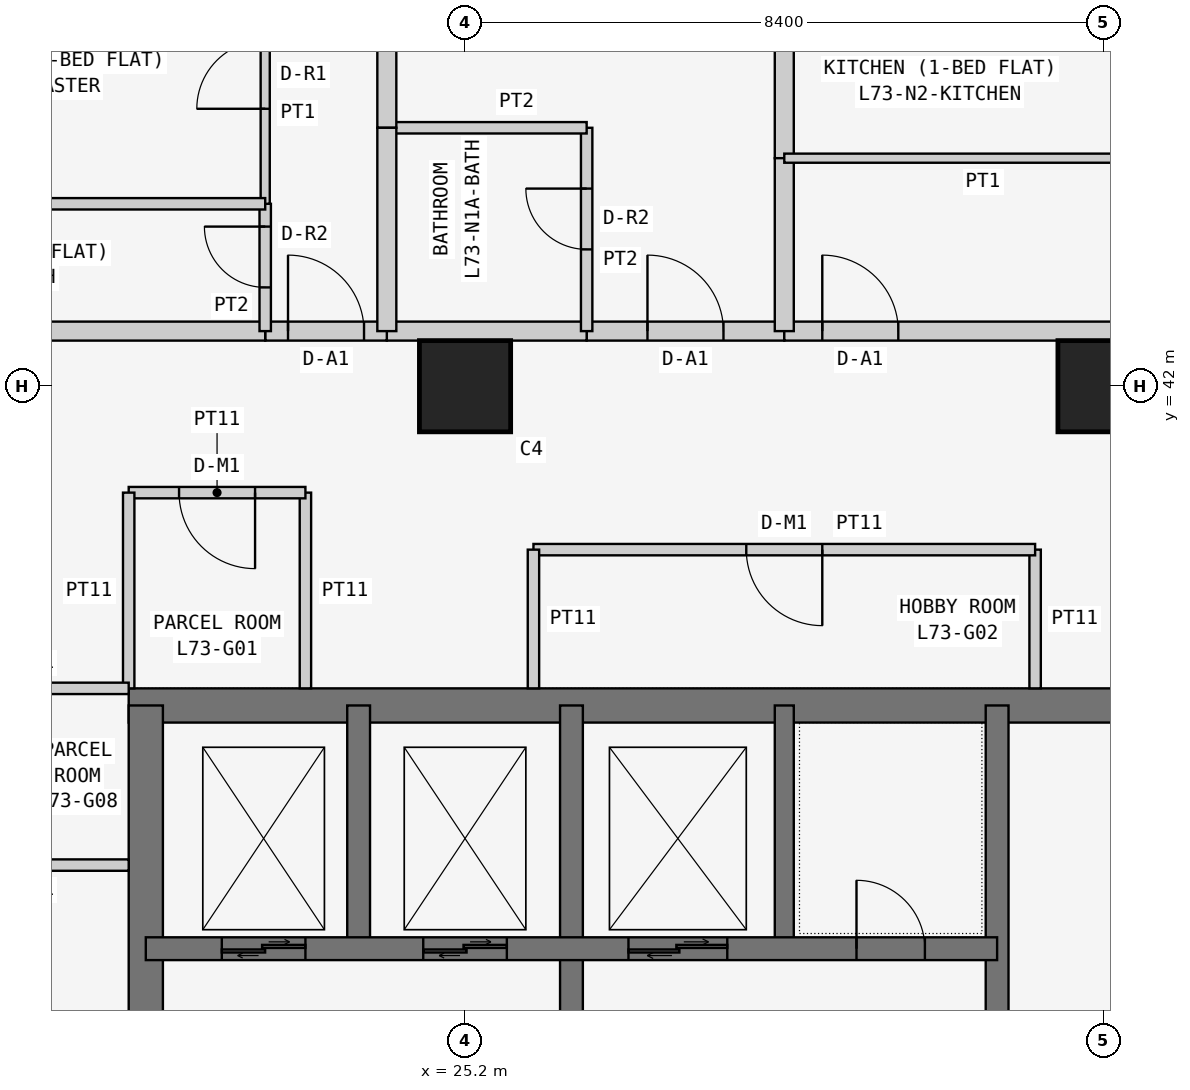
"""IFC4 building model, lengths in metres.
Left out: names, types, materials, properties, quantities, classifications, styles, units other than length and angle.
Written with IfcOpenShell. Run it as: python <this file> out.ifc"""

import sys

from ifc_helpers import new_model, si_unit, direction, frame, frame_2d, origin, origin_2d, place, context, subcontext, project, spatial, rectangle, extrude, element, fill, save


model = new_model("IFC4")
c1 = context("Model", 3, precision=1e-05, world=origin(), true_north=direction((0.0, 1.0)))
c2 = subcontext(c1, "Body", "Model", "MODEL_VIEW")
j1 = project(units=[si_unit("LENGTHUNIT", "METRE"), si_unit("PLANEANGLEUNIT", "RADIAN")], contexts=[c1])
p1 = place(None, origin())
s1 = spatial("IfcSite", under=j1, at=p1, CompositionType="ELEMENT")
p2 = place(p1, origin())
s2 = spatial("IfcBuilding", under=s1, at=p2, CompositionType="ELEMENT")
p3 = place(p2, frame((0.0, 0.0, 279.3)))
s3 = spatial("IfcBuildingStorey", under=s2, at=p3, CompositionType="ELEMENT", Elevation=279.3)
for number, where, z_axis, x_axis in (
    (1, (25.2, 42.0, 0.0), (0.0, 0.0, 1.0), (1.0, 0.0, 0.0)),
    (2, (33.6, 42.0, 0.0), (0.0, 0.0, 1.0), (1.0, 0.0, 0.0)),
):
    element("IfcColumn", number, at=place(p3, frame(where, z_axis=z_axis, x_axis=x_axis)), inside=s3, PredefinedType="COLUMN", context=c2, shape_type="SweptSolid", body=[
        extrude(rectangle(XDim=1.2, YDim=1.2, at=origin_2d()), origin(), (0.0, 0.0, 1.0), 3.6),
    ])
p4 = place(p3, frame((37.8, 37.8, 0.0), z_axis=(0.0, 0.0, 1.0), x_axis=(-1.0, 0.0, 0.0)))
e3 = element("IfcWall", 3, at=p4, inside=s3, PredefinedType="SHEAR", context=c2, shape_type="SweptSolid", body=[
    extrude(rectangle(XDim=17.025, YDim=0.45, at=frame_2d((8.513, 0.0))), origin(), (0.0, 0.0, 1.0), 3.6),
])
p5 = place(p3, frame((21.0, 37.8, 0.0), z_axis=(0.0, 0.0, 1.0), x_axis=(0.0, -1.0, 0.0)))
e4 = element("IfcWall", 4, at=p5, inside=s3, PredefinedType="SHEAR", context=c2, shape_type="SweptSolid", body=[
    extrude(rectangle(XDim=17.025, YDim=0.45, at=frame_2d((8.513, 0.0))), origin(), (0.0, 0.0, 1.0), 3.6),
])
p6 = place(p5, frame((5.4, 0.0, 0.0)))
e5 = element("IfcOpeningElement", 5, at=p6, cuts=e4, PredefinedType="OPENING", context=c2, shape_type="SweptSolid", body=[
    extrude(rectangle(XDim=1.2, YDim=2.1, at=frame_2d((0.6, 1.05))), frame((0.0, 0.235, 0.0), z_axis=(0.0, -1.0, 0.0), x_axis=(1.0, 0.0, 0.0)), (0.0, 0.0, 1.0), 0.47),
])
p7 = place(p3, frame((26.6, 21.0, 0.0), z_axis=(0.0, 0.0, 1.0), x_axis=(0.0, 1.0, 0.0)))
e6 = element("IfcWall", 6, at=p7, inside=s3, PredefinedType="SHEAR", context=c2, shape_type="SweptSolid", body=[
    extrude(rectangle(XDim=16.8, YDim=0.3, at=frame_2d((8.4, 0.0))), origin(), (0.0, 0.0, 1.0), 3.6),
])
p8 = place(p7, frame((10.4, 0.0, 0.0)))
e7 = element("IfcOpeningElement", 7, at=p8, cuts=e6, PredefinedType="OPENING", context=c2, shape_type="SweptSolid", body=[
    extrude(rectangle(XDim=1.2, YDim=2.1, at=frame_2d((0.6, 1.05))), frame((0.0, 0.16, 0.0), z_axis=(0.0, -1.0, 0.0), x_axis=(1.0, 0.0, 0.0)), (0.0, 0.0, 1.0), 0.32),
])
p9 = place(p3, frame((21.0, 34.6, 0.0), z_axis=(0.0, 0.0, 1.0), x_axis=(1.0, 0.0, 0.0)))
e8 = element("IfcWall", 8, at=p9, inside=s3, PredefinedType="SHEAR", context=c2, shape_type="SweptSolid", body=[
    extrude(rectangle(XDim=11.2, YDim=0.3, at=frame_2d((5.6, 0.0))), origin(), (0.0, 0.0, 1.0), 3.6),
])
p10 = place(p9, frame((9.35, 0.0, 0.0)))
e9 = element("IfcOpeningElement", 9, at=p10, cuts=e8, PredefinedType="OPENING", context=c2, shape_type="SweptSolid", body=[
    extrude(rectangle(XDim=0.9, YDim=2.1, at=frame_2d((0.45, 1.05))), frame((0.0, 0.16, 0.0), z_axis=(0.0, -1.0, 0.0), x_axis=(1.0, 0.0, 0.0)), (0.0, 0.0, 1.0), 0.32),
])
p11 = place(p9, frame((1.0, 0.0, 0.0)))
e10 = element("IfcOpeningElement", 10, at=p11, cuts=e8, PredefinedType="OPENING", context=c2, shape_type="SweptSolid", body=[
    extrude(rectangle(XDim=1.1, YDim=2.1, at=frame_2d((0.55, 1.05))), frame((0.0, 0.16, 0.0), z_axis=(0.0, -1.0, 0.0), x_axis=(1.0, 0.0, 0.0)), (0.0, 0.0, 1.0), 0.32),
])
p12 = place(p9, frame((3.65, 0.0, 0.0)))
e11 = element("IfcOpeningElement", 11, at=p12, cuts=e8, PredefinedType="OPENING", context=c2, shape_type="SweptSolid", body=[
    extrude(rectangle(XDim=1.1, YDim=2.1, at=frame_2d((0.55, 1.05))), frame((0.0, 0.16, 0.0), z_axis=(0.0, -1.0, 0.0), x_axis=(1.0, 0.0, 0.0)), (0.0, 0.0, 1.0), 0.32),
])
p13 = place(p9, frame((6.35, 0.0, 0.0)))
e12 = element("IfcOpeningElement", 12, at=p13, cuts=e8, PredefinedType="OPENING", context=c2, shape_type="SweptSolid", body=[
    extrude(rectangle(XDim=1.3, YDim=2.1, at=frame_2d((0.65, 1.05))), frame((0.0, 0.16, 0.0), z_axis=(0.0, -1.0, 0.0), x_axis=(1.0, 0.0, 0.0)), (0.0, 0.0, 1.0), 0.32),
])
p14 = place(p3, frame((23.8, 34.6, 0.0), z_axis=(0.0, 0.0, 1.0), x_axis=(0.0, 1.0, 0.0)))
e13 = element("IfcWall", 13, at=p14, inside=s3, PredefinedType="SHEAR", context=c2, shape_type="SweptSolid", body=[
    extrude(rectangle(XDim=3.2, YDim=0.3, at=frame_2d((1.6, 0.0))), origin(), (0.0, 0.0, 1.0), 3.6),
])
p15 = place(p3, frame((32.2, 29.25, 0.0), z_axis=(0.0, 0.0, 1.0), x_axis=(0.0, 1.0, 0.0)))
e14 = element("IfcWall", 14, at=p15, inside=s3, PredefinedType="SHEAR", context=c2, shape_type="SweptSolid", body=[
    extrude(rectangle(XDim=8.55, YDim=0.3, at=frame_2d((4.275, 0.0))), origin(), (0.0, 0.0, 1.0), 3.6),
])
p16 = place(p3, frame((29.4, 34.6, 0.0), z_axis=(0.0, 0.0, 1.0), x_axis=(0.0, 1.0, 0.0)))
e15 = element("IfcWall", 15, at=p16, inside=s3, PredefinedType="SHEAR", context=c2, shape_type="SweptSolid", body=[
    extrude(rectangle(XDim=3.2, YDim=0.25, at=frame_2d((1.6, 0.0))), origin(), (0.0, 0.0, 1.0), 3.6),
])
p17 = place(p3, frame((23.1, 38.025, 0.0), z_axis=(0.0, 0.0, 1.0), x_axis=(0.0, 1.0, 0.0)))
e16 = element("IfcWall", 16, at=p17, inside=s3, PredefinedType="PARTITIONING", context=c2, shape_type="SweptSolid", body=[
    extrude(rectangle(XDim=2.575, YDim=0.15, at=frame_2d((1.288, 0.0))), origin(), (0.0, 0.0, 1.0), 3.45),
])
p18 = place(p3, frame((23.1, 40.6, 0.0), z_axis=(0.0, 0.0, 1.0), x_axis=(-1.0, 0.0, 0.0)))
e17 = element("IfcWall", 17, at=p18, inside=s3, PredefinedType="PARTITIONING", context=c2, shape_type="SweptSolid", body=[
    extrude(rectangle(XDim=2.325, YDim=0.15, at=frame_2d((1.163, 0.0))), origin(), (0.0, 0.0, 1.0), 3.45),
])
p19 = place(p18, frame((0.663, 0.0, 0.0)))
e18 = element("IfcOpeningElement", 18, at=p19, cuts=e17, PredefinedType="OPENING", context=c2, shape_type="SweptSolid", body=[
    extrude(rectangle(XDim=1.0, YDim=2.1, at=frame_2d((0.5, 1.05))), frame((0.0, 0.085, 0.0), z_axis=(0.0, -1.0, 0.0), x_axis=(1.0, 0.0, 0.0)), (0.0, 0.0, 1.0), 0.17),
])
p20 = place(p3, frame((20.775, 40.6, 0.0), z_axis=(0.0, 0.0, 1.0), x_axis=(0.0, -1.0, 0.0)))
e19 = element("IfcWall", 19, at=p20, inside=s3, PredefinedType="PARTITIONING", context=c2, shape_type="SweptSolid", body=[
    extrude(rectangle(XDim=2.575, YDim=0.15, at=frame_2d((1.288, 0.0))), origin(), (0.0, 0.0, 1.0), 3.45),
])
p21 = place(p3, frame((32.7, 38.025, 0.0), z_axis=(0.0, 0.0, 1.0), x_axis=(0.0, 1.0, 0.0)))
e20 = element("IfcWall", 20, at=p21, inside=s3, PredefinedType="PARTITIONING", context=c2, shape_type="SweptSolid", body=[
    extrude(rectangle(XDim=1.825, YDim=0.15, at=frame_2d((0.913, 0.0))), origin(), (0.0, 0.0, 1.0), 3.45),
])
p22 = place(p3, frame((32.7, 39.85, 0.0), z_axis=(0.0, 0.0, 1.0), x_axis=(-1.0, 0.0, 0.0)))
e21 = element("IfcWall", 21, at=p22, inside=s3, PredefinedType="PARTITIONING", context=c2, shape_type="SweptSolid", body=[
    extrude(rectangle(XDim=6.6, YDim=0.15, at=frame_2d((3.3, 0.0))), origin(), (0.0, 0.0, 1.0), 3.45),
])
p23 = place(p22, frame((2.8, 0.0, 0.0)))
e22 = element("IfcOpeningElement", 22, at=p23, cuts=e21, PredefinedType="OPENING", context=c2, shape_type="SweptSolid", body=[
    extrude(rectangle(XDim=1.0, YDim=2.1, at=frame_2d((0.5, 1.05))), frame((0.0, 0.085, 0.0), z_axis=(0.0, -1.0, 0.0), x_axis=(1.0, 0.0, 0.0)), (0.0, 0.0, 1.0), 0.17),
])
p24 = place(p3, frame((26.1, 39.85, 0.0), z_axis=(0.0, 0.0, 1.0), x_axis=(0.0, -1.0, 0.0)))
e23 = element("IfcWall", 23, at=p24, inside=s3, PredefinedType="PARTITIONING", context=c2, shape_type="SweptSolid", body=[
    extrude(rectangle(XDim=1.825, YDim=0.15, at=frame_2d((0.913, 0.0))), origin(), (0.0, 0.0, 1.0), 3.45),
])
for number, where, z_axis, x_axis in (
    (24, (20.775, 38.025, 0.0), (0.0, 0.0, 1.0), (-1.0, 0.0, 0.0)),
    (25, (18.2, 35.7, 0.0), (0.0, 0.0, 1.0), (1.0, 0.0, 0.0)),
):
    element("IfcWall", number, at=place(p3, frame(where, z_axis=z_axis, x_axis=x_axis)), inside=s3, PredefinedType="PARTITIONING", context=c2, shape_type="SweptSolid", body=[
        extrude(rectangle(XDim=2.575, YDim=0.15, at=frame_2d((1.288, 0.0))), origin(), (0.0, 0.0, 1.0), 3.45),
    ])
p25 = place(p3, frame((26.8, 42.725, 0.0), z_axis=(0.0, 0.0, 1.0), x_axis=(1.0, 0.0, 0.0)))
e26 = element("IfcWall", 26, at=p25, inside=s3, PredefinedType="PARTITIONING", context=c2, shape_type="SweptSolid", body=[
    extrude(rectangle(XDim=2.6, YDim=0.25, at=frame_2d((1.3, 0.0))), origin(), (0.0, 0.0, 1.0), 3.45),
])
p26 = place(p25, frame((0.8, 0.0, 0.0)))
e27 = element("IfcOpeningElement", 27, at=p26, cuts=e26, PredefinedType="OPENING", context=c2, shape_type="SweptSolid", body=[
    extrude(rectangle(XDim=1.0, YDim=2.1, at=frame_2d((0.5, 1.05))), frame((0.0, 0.135, 0.0), z_axis=(0.0, -1.0, 0.0), x_axis=(1.0, 0.0, 0.0)), (0.0, 0.0, 1.0), 0.27),
])
p27 = place(p3, frame((24.171, 42.725, 0.0), z_axis=(0.0, 0.0, 1.0), x_axis=(1.0, 0.0, 0.0)))
e28 = element("IfcWall", 28, at=p27, inside=s3, PredefinedType="PARTITIONING", context=c2, shape_type="SweptSolid", body=[
    extrude(rectangle(XDim=2.629, YDim=0.25, at=frame_2d((1.314, 0.0))), origin(), (0.0, 0.0, 1.0), 3.45),
])
p28 = place(p3, frame((22.571, 42.725, 0.0), z_axis=(0.0, 0.0, 1.0), x_axis=(1.0, 0.0, 0.0)))
e29 = element("IfcWall", 29, at=p28, inside=s3, PredefinedType="PARTITIONING", context=c2, shape_type="SweptSolid", body=[
    extrude(rectangle(XDim=1.6, YDim=0.25, at=frame_2d((0.8, 0.0))), origin(), (0.0, 0.0, 1.0), 3.45),
])
p29 = place(p28, frame((0.3, 0.0, 0.0)))
e30 = element("IfcOpeningElement", 30, at=p29, cuts=e29, PredefinedType="OPENING", context=c2, shape_type="SweptSolid", body=[
    extrude(rectangle(XDim=1.0, YDim=2.1, at=frame_2d((0.5, 1.05))), frame((0.0, 0.135, 0.0), z_axis=(0.0, -1.0, 0.0), x_axis=(1.0, 0.0, 0.0)), (0.0, 0.0, 1.0), 0.27),
])
p30 = place(p3, frame((16.1, 42.725, 0.0), z_axis=(0.0, 0.0, 1.0), x_axis=(1.0, 0.0, 0.0)))
e31 = element("IfcWall", 31, at=p30, inside=s3, PredefinedType="PARTITIONING", context=c2, shape_type="SweptSolid", body=[
    extrude(rectangle(XDim=6.471, YDim=0.25, at=frame_2d((3.235, 0.0))), origin(), (0.0, 0.0, 1.0), 3.45),
])
p31 = place(p3, frame((29.4, 42.725, 0.0), z_axis=(0.0, 0.0, 1.0), x_axis=(1.0, 0.0, 0.0)))
e32 = element("IfcWall", 32, at=p31, inside=s3, PredefinedType="PARTITIONING", context=c2, shape_type="SweptSolid", body=[
    extrude(rectangle(XDim=6.429, YDim=0.25, at=frame_2d((3.215, 0.0))), origin(), (0.0, 0.0, 1.0), 3.45),
])
p32 = place(p31, frame((0.5, 0.0, 0.0)))
e33 = element("IfcOpeningElement", 33, at=p32, cuts=e32, PredefinedType="OPENING", context=c2, shape_type="SweptSolid", body=[
    extrude(rectangle(XDim=1.0, YDim=2.1, at=frame_2d((0.5, 1.05))), frame((0.0, 0.135, 0.0), z_axis=(0.0, -1.0, 0.0), x_axis=(1.0, 0.0, 0.0)), (0.0, 0.0, 1.0), 0.27),
])
p33 = place(p3, frame((26.8, 42.725, 0.0), z_axis=(0.0, 0.0, 1.0), x_axis=(0.0, 1.0, 0.0)))
e34 = element("IfcWall", 34, at=p33, inside=s3, PredefinedType="PARTITIONING", context=c2, shape_type="SweptSolid", body=[
    extrude(rectangle(XDim=2.675, YDim=0.15, at=frame_2d((1.337, 0.0))), origin(), (0.0, 0.0, 1.0), 3.45),
])
p34 = place(p33, frame((1.075, 0.0, 0.0)))
e35 = element("IfcOpeningElement", 35, at=p34, cuts=e34, PredefinedType="OPENING", context=c2, shape_type="SweptSolid", body=[
    extrude(rectangle(XDim=0.8, YDim=2.1, at=frame_2d((0.4, 1.05))), frame((0.0, 0.085, 0.0), z_axis=(0.0, -1.0, 0.0), x_axis=(1.0, 0.0, 0.0)), (0.0, 0.0, 1.0), 0.17),
])
p35 = place(p3, frame((26.8, 45.4, 0.0), z_axis=(0.0, 0.0, 1.0), x_axis=(-1.0, 0.0, 0.0)))
e36 = element("IfcWall", 36, at=p35, inside=s3, PredefinedType="PARTITIONING", context=c2, shape_type="SweptSolid", body=[
    extrude(rectangle(XDim=2.629, YDim=0.15, at=frame_2d((1.314, 0.0))), origin(), (0.0, 0.0, 1.0), 3.45),
])
p36 = place(p3, frame((24.171, 45.4, 0.0), z_axis=(0.0, 0.0, 1.0), x_axis=(0.0, 1.0, 0.0)))
e37 = element("IfcWall", 37, at=p36, inside=s3, PredefinedType="PARTITIONING", context=c2, shape_type="SweptSolid", body=[
    extrude(rectangle(XDim=5.65, YDim=0.25, at=frame_2d((2.825, 0.0))), origin(), (0.0, 0.0, 1.0), 3.45),
])
p37 = place(p3, frame((29.4, 47.0, 0.0), z_axis=(0.0, 0.0, 1.0), x_axis=(0.0, -1.0, 0.0)))
e38 = element("IfcWall", 38, at=p37, inside=s3, PredefinedType="PARTITIONING", context=c2, shape_type="SweptSolid", body=[
    extrude(rectangle(XDim=2.0, YDim=0.25, at=frame_2d((1.0, 0.0))), origin(), (0.0, 0.0, 1.0), 2.848),
])
p38 = place(p3, frame((29.4, 45.0, 0.0), z_axis=(0.0, 0.0, 1.0), x_axis=(0.0, -1.0, 0.0)))
e39 = element("IfcWall", 39, at=p38, inside=s3, PredefinedType="PARTITIONING", context=c2, shape_type="SweptSolid", body=[
    extrude(rectangle(XDim=2.275, YDim=0.25, at=frame_2d((1.137, 0.0))), origin(), (0.0, 0.0, 1.0), 2.848),
])
p39 = place(p3, frame((24.171, 45.4, 0.0), z_axis=(0.0, 0.0, 1.0), x_axis=(0.0, -1.0, 0.0)))
e40 = element("IfcWall", 40, at=p39, inside=s3, PredefinedType="PARTITIONING", context=c2, shape_type="SweptSolid", body=[
    extrude(rectangle(XDim=2.675, YDim=0.25, at=frame_2d((1.337, 0.0))), origin(), (0.0, 0.0, 1.0), 3.45),
])
p40 = place(p3, frame((22.571, 42.725, 0.0), z_axis=(0.0, 0.0, 1.0), x_axis=(0.0, 1.0, 0.0)))
e41 = element("IfcWall", 41, at=p40, inside=s3, PredefinedType="PARTITIONING", context=c2, shape_type="SweptSolid", body=[
    extrude(rectangle(XDim=1.675, YDim=0.15, at=frame_2d((0.837, 0.0))), origin(), (0.0, 0.0, 1.0), 3.45),
])
p41 = place(p40, frame((0.575, 0.0, 0.0)))
e42 = element("IfcOpeningElement", 42, at=p41, cuts=e41, PredefinedType="OPENING", context=c2, shape_type="SweptSolid", body=[
    extrude(rectangle(XDim=0.8, YDim=2.1, at=frame_2d((0.4, 1.05))), frame((0.0, 0.085, 0.0), z_axis=(0.0, -1.0, 0.0), x_axis=(1.0, 0.0, 0.0)), (0.0, 0.0, 1.0), 0.17),
])
p42 = place(p3, frame((22.571, 44.4, 0.0), z_axis=(0.0, 0.0, 1.0), x_axis=(0.0, 1.0, 0.0)))
e43 = element("IfcWall", 43, at=p42, inside=s3, PredefinedType="PARTITIONING", context=c2, shape_type="SweptSolid", body=[
    extrude(rectangle(XDim=3.4, YDim=0.12, at=frame_2d((1.7, 0.0))), origin(), (0.0, 0.0, 1.0), 3.45),
])
p43 = place(p42, frame((1.25, 0.0, 0.0)))
e44 = element("IfcOpeningElement", 44, at=p43, cuts=e43, PredefinedType="OPENING", context=c2, shape_type="SweptSolid", body=[
    extrude(rectangle(XDim=0.9, YDim=2.1, at=frame_2d((0.45, 1.05))), frame((0.0, 0.07, 0.0), z_axis=(0.0, -1.0, 0.0), x_axis=(1.0, 0.0, 0.0)), (0.0, 0.0, 1.0), 0.14),
])
p44 = place(p3, frame((22.571, 44.4, 0.0), z_axis=(0.0, 0.0, 1.0), x_axis=(-1.0, 0.0, 0.0)))
e45 = element("IfcWall", 45, at=p44, inside=s3, PredefinedType="PARTITIONING", context=c2, shape_type="SweptSolid", body=[
    extrude(rectangle(XDim=6.471, YDim=0.15, at=frame_2d((3.235, 0.0))), origin(), (0.0, 0.0, 1.0), 3.45),
])
p45 = place(p3, frame((34.629, 45.0, 0.0), z_axis=(0.0, 0.0, 1.0), x_axis=(-1.0, 0.0, 0.0)))
e46 = element("IfcWall", 46, at=p45, inside=s3, PredefinedType="PARTITIONING", context=c2, shape_type="SweptSolid", body=[
    extrude(rectangle(XDim=5.229, YDim=0.12, at=frame_2d((2.615, 0.0))), origin(), (0.0, 0.0, 1.0), 3.45),
])
p46 = place(p19, origin())
e47 = element("IfcDoor", 47, at=p46, inside=s3, OperationType="SINGLE_SWING_LEFT", PredefinedType="DOOR", context=c2, shape_type="SweptSolid", body=[
    extrude(rectangle(XDim=1.0, YDim=2.1, at=frame_2d((0.5, 1.05))), frame((0.0, 0.025, 0.0), z_axis=(0.0, -1.0, 0.0), x_axis=(1.0, 0.0, 0.0)), (0.0, 0.0, 1.0), 0.05),
])
fill(e18, e47)
p47 = place(p23, origin())
e48 = element("IfcDoor", 48, at=p47, inside=s3, OperationType="SINGLE_SWING_LEFT", PredefinedType="DOOR", context=c2, shape_type="SweptSolid", body=[
    extrude(rectangle(XDim=1.0, YDim=2.1, at=frame_2d((0.5, 1.05))), frame((0.0, 0.025, 0.0), z_axis=(0.0, -1.0, 0.0), x_axis=(1.0, 0.0, 0.0)), (0.0, 0.0, 1.0), 0.05),
])
fill(e22, e48)
p48 = place(p26, origin())
e49 = element("IfcDoor", 49, at=p48, inside=s3, OperationType="SINGLE_SWING_LEFT", PredefinedType="DOOR", context=c2, shape_type="SweptSolid", body=[
    extrude(rectangle(XDim=1.0, YDim=2.1, at=frame_2d((0.5, 1.05))), frame((0.0, 0.025, 0.0), z_axis=(0.0, -1.0, 0.0), x_axis=(1.0, 0.0, 0.0)), (0.0, 0.0, 1.0), 0.05),
])
fill(e27, e49)
p49 = place(p34, origin())
e50 = element("IfcDoor", 50, at=p49, inside=s3, OperationType="SINGLE_SWING_RIGHT", PredefinedType="DOOR", context=c2, shape_type="SweptSolid", body=[
    extrude(rectangle(XDim=0.8, YDim=2.1, at=frame_2d((0.4, 1.05))), frame((0.0, 0.025, 0.0), z_axis=(0.0, -1.0, 0.0), x_axis=(1.0, 0.0, 0.0)), (0.0, 0.0, 1.0), 0.05),
])
fill(e35, e50)
p50 = place(p29, origin())
e51 = element("IfcDoor", 51, at=p50, inside=s3, OperationType="SINGLE_SWING_LEFT", PredefinedType="DOOR", context=c2, shape_type="SweptSolid", body=[
    extrude(rectangle(XDim=1.0, YDim=2.1, at=frame_2d((0.5, 1.05))), frame((0.0, 0.025, 0.0), z_axis=(0.0, -1.0, 0.0), x_axis=(1.0, 0.0, 0.0)), (0.0, 0.0, 1.0), 0.05),
])
fill(e30, e51)
p51 = place(p41, origin())
e52 = element("IfcDoor", 52, at=p51, inside=s3, OperationType="SINGLE_SWING_RIGHT", PredefinedType="DOOR", context=c2, shape_type="SweptSolid", body=[
    extrude(rectangle(XDim=0.8, YDim=2.1, at=frame_2d((0.4, 1.05))), frame((0.0, 0.025, 0.0), z_axis=(0.0, -1.0, 0.0), x_axis=(1.0, 0.0, 0.0)), (0.0, 0.0, 1.0), 0.05),
])
fill(e42, e52)
p52 = place(p43, origin())
e53 = element("IfcDoor", 53, at=p52, inside=s3, OperationType="SINGLE_SWING_LEFT", PredefinedType="DOOR", context=c2, shape_type="SweptSolid", body=[
    extrude(rectangle(XDim=0.9, YDim=2.1, at=frame_2d((0.45, 1.05))), frame((0.0, 0.025, 0.0), z_axis=(0.0, -1.0, 0.0), x_axis=(1.0, 0.0, 0.0)), (0.0, 0.0, 1.0), 0.05),
])
fill(e44, e53)
p53 = place(p32, origin())
e54 = element("IfcDoor", 54, at=p53, inside=s3, OperationType="SINGLE_SWING_LEFT", PredefinedType="DOOR", context=c2, shape_type="SweptSolid", body=[
    extrude(rectangle(XDim=1.0, YDim=2.1, at=frame_2d((0.5, 1.05))), frame((0.0, 0.025, 0.0), z_axis=(0.0, -1.0, 0.0), x_axis=(1.0, 0.0, 0.0)), (0.0, 0.0, 1.0), 0.05),
])
fill(e33, e54)
p54 = place(p10, origin())
e55 = element("IfcDoor", 55, at=p54, inside=s3, OperationType="SINGLE_SWING_LEFT", PredefinedType="DOOR", context=c2, shape_type="SweptSolid", body=[
    extrude(rectangle(XDim=0.9, YDim=2.1, at=frame_2d((0.45, 1.05))), frame((0.0, 0.025, 0.0), z_axis=(0.0, -1.0, 0.0), x_axis=(1.0, 0.0, 0.0)), (0.0, 0.0, 1.0), 0.05),
])
fill(e9, e55)
p55 = place(p11, origin())
e56 = element("IfcDoor", 56, at=p55, inside=s3, OperationType="DOUBLE_DOOR_SLIDING", PredefinedType="DOOR", context=c2, shape_type="SweptSolid", body=[
    extrude(rectangle(XDim=1.1, YDim=2.1, at=frame_2d((0.55, 1.05))), frame((0.0, 0.025, 0.0), z_axis=(0.0, -1.0, 0.0), x_axis=(1.0, 0.0, 0.0)), (0.0, 0.0, 1.0), 0.05),
])
fill(e10, e56)
p56 = place(p12, origin())
e57 = element("IfcDoor", 57, at=p56, inside=s3, OperationType="DOUBLE_DOOR_SLIDING", PredefinedType="DOOR", context=c2, shape_type="SweptSolid", body=[
    extrude(rectangle(XDim=1.1, YDim=2.1, at=frame_2d((0.55, 1.05))), frame((0.0, 0.025, 0.0), z_axis=(0.0, -1.0, 0.0), x_axis=(1.0, 0.0, 0.0)), (0.0, 0.0, 1.0), 0.05),
])
fill(e11, e57)
p57 = place(p13, origin())
e58 = element("IfcDoor", 58, at=p57, inside=s3, OperationType="DOUBLE_DOOR_SLIDING", PredefinedType="DOOR", context=c2, shape_type="SweptSolid", body=[
    extrude(rectangle(XDim=1.3, YDim=2.1, at=frame_2d((0.65, 1.05))), frame((0.0, 0.025, 0.0), z_axis=(0.0, -1.0, 0.0), x_axis=(1.0, 0.0, 0.0)), (0.0, 0.0, 1.0), 0.05),
])
fill(e12, e58)
save(model, sys.argv[1])
